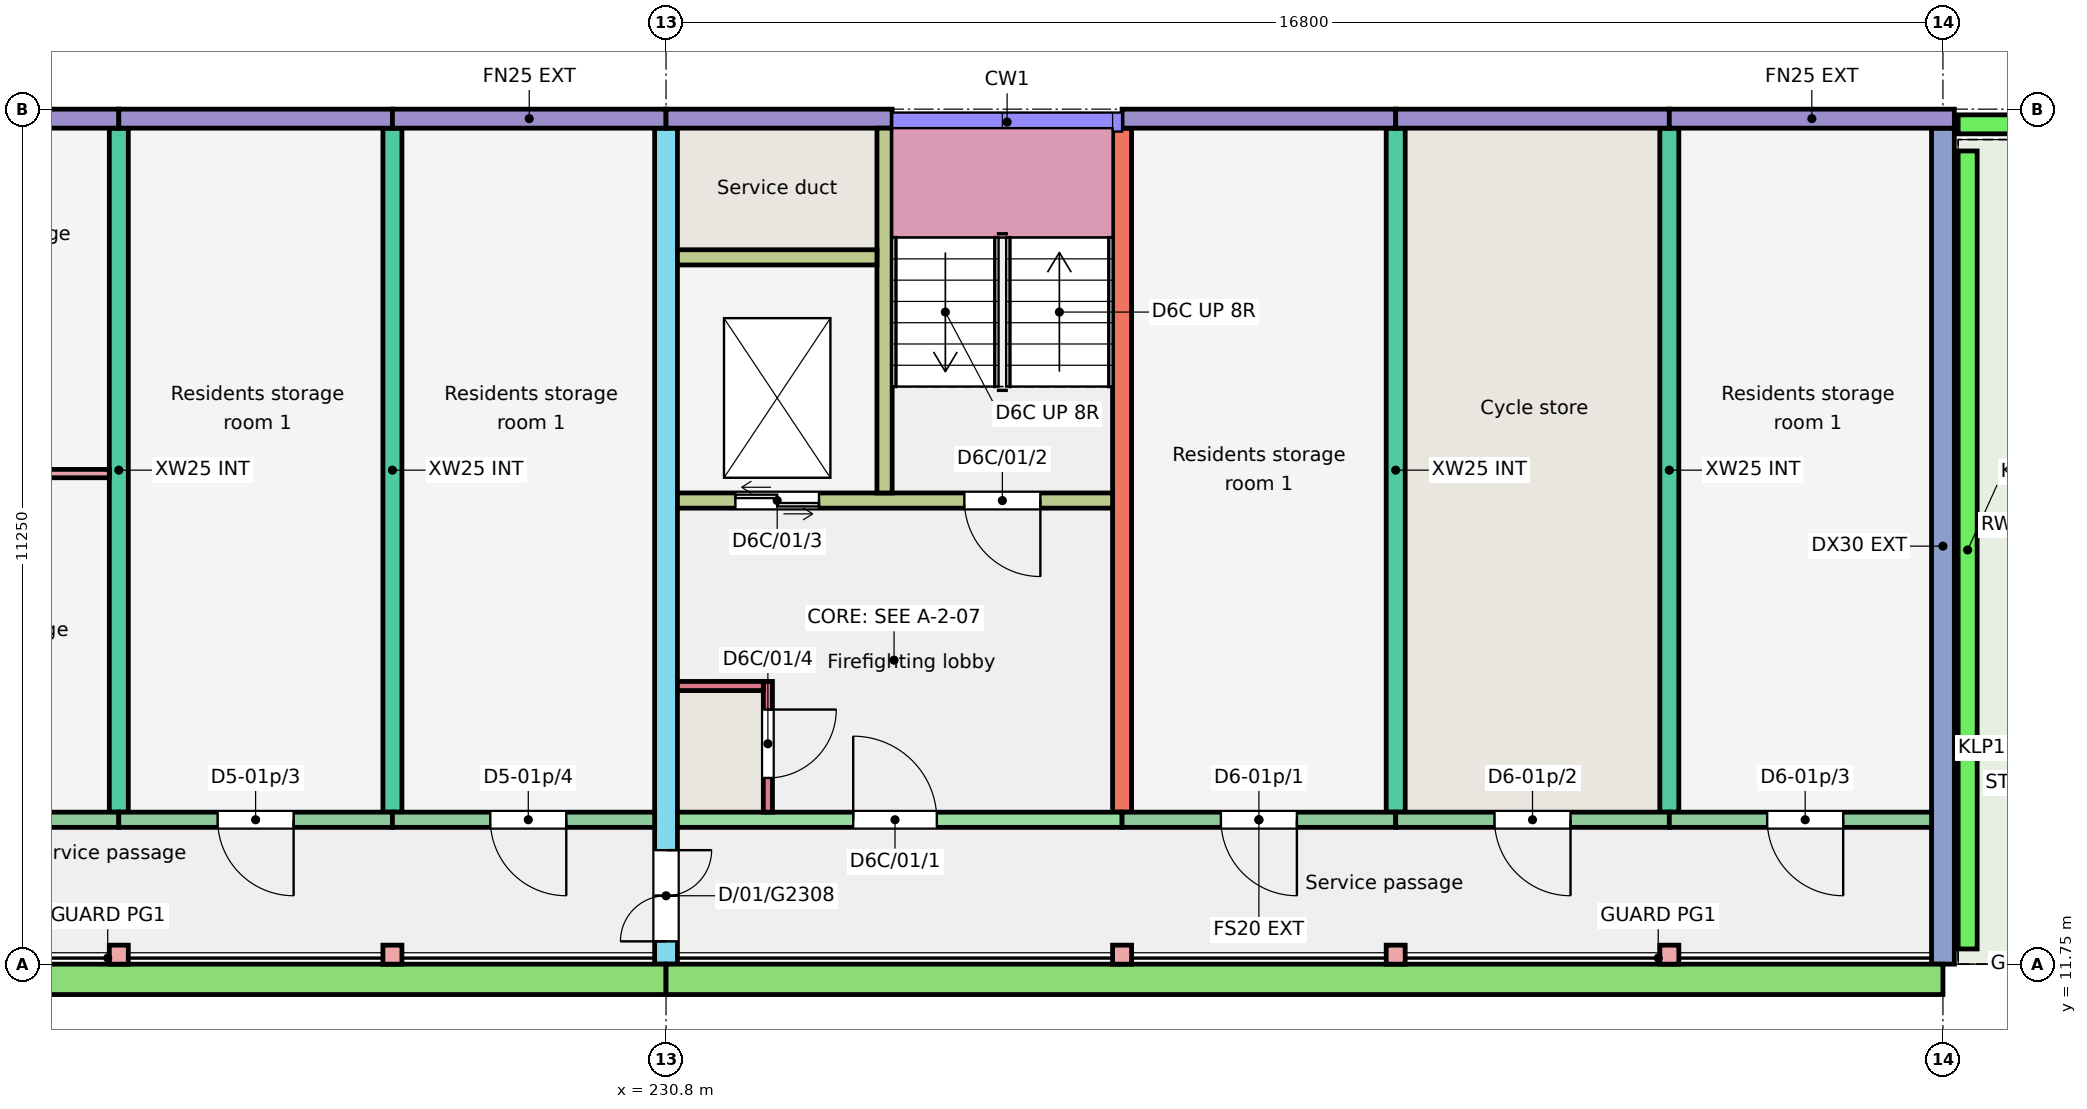
"""IFC4 building model, lengths in metres.
Left out: names, types, materials, properties, quantities, classifications, styles, units other than length and angle.
Written with IfcOpenShell. Run it as: python <this file> out.ifc"""

import sys

from ifc_helpers import new_model, si_unit, direction, frame, frame_2d, origin, origin_2d, place, context, subcontext, project, spatial, rectangle, extrude, element, fill, save


model = new_model("IFC4")
c1 = context("Model", 3, precision=1e-05, world=origin(), true_north=direction((0.0, 1.0)))
c2 = subcontext(c1, "Body", "Model", "MODEL_VIEW")
j1 = project(units=[si_unit("LENGTHUNIT", "METRE"), si_unit("PLANEANGLEUNIT", "RADIAN")], contexts=[c1])
p1 = place(None, origin())
s1 = spatial("IfcSite", under=j1, at=p1, CompositionType="ELEMENT")
p2 = place(p1, origin())
s2 = spatial("IfcBuilding", under=s1, at=p2, CompositionType="ELEMENT")
p3 = place(p2, frame((0.0, 0.0, 3.0)))
s3 = spatial("IfcBuildingStorey", under=s2, at=p3, CompositionType="ELEMENT", Elevation=3.0)
for number, where, z_axis, x_axis in (
    (1, (223.6, 13.75, 0.0), (0.0, 0.0, 1.0), (0.0, 1.0, 0.0)),
    (2, (227.2, 13.75, 0.0), (0.0, 0.0, 1.0), (0.0, 1.0, 0.0)),
):
    element("IfcWall", number, at=place(p3, frame(where, z_axis=z_axis, x_axis=x_axis)), inside=s3, PredefinedType="SHEAR", context=c2, shape_type="SweptSolid", body=[
        extrude(rectangle(XDim=9.0, YDim=0.25, at=frame_2d((4.5, 0.0))), origin(), (0.0, 0.0, 1.0), 3.0),
    ])
p4 = place(p3, frame((230.8, 11.75, 0.0), z_axis=(0.0, 0.0, 1.0), x_axis=(0.0, 1.0, 0.0)))
e3 = element("IfcWall", 3, at=p4, inside=s3, PredefinedType="SHEAR", context=c2, shape_type="SweptSolid", body=[
    extrude(rectangle(XDim=11.0, YDim=0.3, at=frame_2d((5.5, 0.0))), origin(), (0.0, 0.0, 1.0), 3.0),
])
p5 = place(p4, frame((0.3, 0.0, 0.0)))
e4 = element("IfcOpeningElement", 4, at=p5, cuts=e3, PredefinedType="OPENING", context=c2, shape_type="SweptSolid", body=[
    extrude(rectangle(XDim=1.2, YDim=2.1, at=frame_2d((0.6, 1.05))), frame((0.0, 0.16, 0.0), z_axis=(0.0, -1.0, 0.0), x_axis=(1.0, 0.0, 0.0)), (0.0, 0.0, 1.0), 0.32),
])
for number, where, z_axis, x_axis in (
    (5, (236.8, 13.75, 0.0), (0.0, 0.0, 1.0), (0.0, 1.0, 0.0)),
    (6, (240.4, 13.75, 0.0), (0.0, 0.0, 1.0), (0.0, 1.0, 0.0)),
    (7, (244.0, 13.75, 0.0), (0.0, 0.0, 1.0), (0.0, 1.0, 0.0)),
):
    element("IfcWall", number, at=place(p3, frame(where, z_axis=z_axis, x_axis=x_axis)), inside=s3, PredefinedType="SHEAR", context=c2, shape_type="SweptSolid", body=[
        extrude(rectangle(XDim=9.0, YDim=0.25, at=frame_2d((4.5, 0.0))), origin(), (0.0, 0.0, 1.0), 3.0),
    ])
p6 = place(p3, frame((247.6, 11.75, 0.0), z_axis=(0.0, 0.0, 1.0), x_axis=(0.0, 1.0, 0.0)))
e8 = element("IfcWall", 8, at=p6, inside=s3, PredefinedType="SHEAR", context=c2, shape_type="SweptSolid", body=[
    extrude(rectangle(XDim=11.0, YDim=0.3, at=frame_2d((5.5, 0.0))), origin(), (0.0, 0.0, 1.0), 3.0),
])
p7 = place(p3, frame((220.0, 22.875, 0.0), z_axis=(0.0, 0.0, 1.0), x_axis=(1.0, 0.0, 0.0)))
e9 = element("IfcWall", 9, at=p7, inside=s3, PredefinedType="SOLIDWALL", context=c2, shape_type="SweptSolid", body=[
    extrude(rectangle(XDim=3.6, YDim=0.25, at=frame_2d((1.8, 0.0))), origin(), (0.0, 0.0, 1.0), 3.0),
])
p8 = place(p3, frame((220.0, 13.65, 0.0), z_axis=(0.0, 0.0, 1.0), x_axis=(1.0, 0.0, 0.0)))
e10 = element("IfcWall", 10, at=p8, inside=s3, PredefinedType="SOLIDWALL", context=c2, shape_type="SweptSolid", body=[
    extrude(rectangle(XDim=3.6, YDim=0.2, at=frame_2d((1.8, 0.0))), origin(), (0.0, 0.0, 1.0), 3.0),
])
p9 = place(p8, frame((1.3, 0.0, 0.0)))
e11 = element("IfcOpeningElement", 11, at=p9, cuts=e10, PredefinedType="OPENING", context=c2, shape_type="SweptSolid", body=[
    extrude(rectangle(XDim=1.0, YDim=2.1, at=frame_2d((0.5, 1.05))), frame((0.0, 0.11, 0.0), z_axis=(0.0, -1.0, 0.0), x_axis=(1.0, 0.0, 0.0)), (0.0, 0.0, 1.0), 0.22),
])
p10 = place(p3, frame((223.6, 22.875, 0.0), z_axis=(0.0, 0.0, 1.0), x_axis=(1.0, 0.0, 0.0)))
e12 = element("IfcWall", 12, at=p10, inside=s3, PredefinedType="SOLIDWALL", context=c2, shape_type="SweptSolid", body=[
    extrude(rectangle(XDim=3.6, YDim=0.25, at=frame_2d((1.8, 0.0))), origin(), (0.0, 0.0, 1.0), 3.0),
])
p11 = place(p3, frame((223.6, 13.65, 0.0), z_axis=(0.0, 0.0, 1.0), x_axis=(1.0, 0.0, 0.0)))
e13 = element("IfcWall", 13, at=p11, inside=s3, PredefinedType="SOLIDWALL", context=c2, shape_type="SweptSolid", body=[
    extrude(rectangle(XDim=3.6, YDim=0.2, at=frame_2d((1.8, 0.0))), origin(), (0.0, 0.0, 1.0), 3.0),
])
p12 = place(p11, frame((1.3, 0.0, 0.0)))
e14 = element("IfcOpeningElement", 14, at=p12, cuts=e13, PredefinedType="OPENING", context=c2, shape_type="SweptSolid", body=[
    extrude(rectangle(XDim=1.0, YDim=2.1, at=frame_2d((0.5, 1.05))), frame((0.0, 0.11, 0.0), z_axis=(0.0, -1.0, 0.0), x_axis=(1.0, 0.0, 0.0)), (0.0, 0.0, 1.0), 0.22),
])
p13 = place(p3, frame((227.2, 22.875, 0.0), z_axis=(0.0, 0.0, 1.0), x_axis=(1.0, 0.0, 0.0)))
e15 = element("IfcWall", 15, at=p13, inside=s3, PredefinedType="SOLIDWALL", context=c2, shape_type="SweptSolid", body=[
    extrude(rectangle(XDim=3.6, YDim=0.25, at=frame_2d((1.8, 0.0))), origin(), (0.0, 0.0, 1.0), 3.0),
])
p14 = place(p3, frame((227.2, 13.65, 0.0), z_axis=(0.0, 0.0, 1.0), x_axis=(1.0, 0.0, 0.0)))
e16 = element("IfcWall", 16, at=p14, inside=s3, PredefinedType="SOLIDWALL", context=c2, shape_type="SweptSolid", body=[
    extrude(rectangle(XDim=3.45, YDim=0.2, at=frame_2d((1.725, 0.0))), origin(), (0.0, 0.0, 1.0), 3.0),
])
p15 = place(p14, frame((1.288, 0.0, 0.0)))
e17 = element("IfcOpeningElement", 17, at=p15, cuts=e16, PredefinedType="OPENING", context=c2, shape_type="SweptSolid", body=[
    extrude(rectangle(XDim=1.0, YDim=2.1, at=frame_2d((0.5, 1.05))), frame((0.0, 0.11, 0.0), z_axis=(0.0, -1.0, 0.0), x_axis=(1.0, 0.0, 0.0)), (0.0, 0.0, 1.0), 0.22),
])
p16 = place(p3, frame((230.8, 22.875, 0.0), z_axis=(0.0, 0.0, 1.0), x_axis=(1.0, 0.0, 0.0)))
e18 = element("IfcWall", 18, at=p16, inside=s3, PredefinedType="SOLIDWALL", context=c2, shape_type="SweptSolid", body=[
    extrude(rectangle(XDim=2.975, YDim=0.25, at=frame_2d((1.487, 0.0))), origin(), (0.0, 0.0, 1.0), 3.0),
])
p17 = place(p3, frame((230.95, 13.65, 0.0), z_axis=(0.0, 0.0, 1.0), x_axis=(1.0, 0.0, 0.0)))
e19 = element("IfcWall", 19, at=p17, inside=s3, PredefinedType="SHEAR", context=c2, shape_type="SweptSolid", body=[
    extrude(rectangle(XDim=5.85, YDim=0.2, at=frame_2d((2.925, 0.0))), origin(), (0.0, 0.0, 1.0), 3.0),
])
p18 = place(p17, frame((2.312, 0.0, 0.0)))
e20 = element("IfcOpeningElement", 20, at=p18, cuts=e19, PredefinedType="OPENING", context=c2, shape_type="SweptSolid", body=[
    extrude(rectangle(XDim=1.1, YDim=2.1, at=frame_2d((0.55, 1.05))), frame((0.0, 0.11, 0.0), z_axis=(0.0, -1.0, 0.0), x_axis=(1.0, 0.0, 0.0)), (0.0, 0.0, 1.0), 0.22),
])
p19 = place(p3, frame((230.95, 17.85, 0.0), z_axis=(0.0, 0.0, 1.0), x_axis=(1.0, 0.0, 0.0)))
e21 = element("IfcWall", 21, at=p19, inside=s3, PredefinedType="SHEAR", context=c2, shape_type="SweptSolid", body=[
    extrude(rectangle(XDim=5.725, YDim=0.2, at=frame_2d((2.863, 0.0))), origin(), (0.0, 0.0, 1.0), 3.0),
])
p20 = place(p19, frame((3.775, 0.0, 0.0)))
e22 = element("IfcOpeningElement", 22, at=p20, cuts=e21, PredefinedType="OPENING", context=c2, shape_type="SweptSolid", body=[
    extrude(rectangle(XDim=1.0, YDim=2.1, at=frame_2d((0.5, 1.05))), frame((0.0, 0.11, 0.0), z_axis=(0.0, -1.0, 0.0), x_axis=(1.0, 0.0, 0.0)), (0.0, 0.0, 1.0), 0.22),
])
p21 = place(p19, frame((0.762, 0.0, 0.0)))
e23 = element("IfcOpeningElement", 23, at=p21, cuts=e21, PredefinedType="OPENING", context=c2, shape_type="SweptSolid", body=[
    extrude(rectangle(XDim=1.1, YDim=2.1, at=frame_2d((0.55, 1.05))), frame((0.0, 0.11, 0.0), z_axis=(0.0, -1.0, 0.0), x_axis=(1.0, 0.0, 0.0)), (0.0, 0.0, 1.0), 0.22),
])
p22 = place(p3, frame((233.675, 17.95, 0.0), z_axis=(0.0, 0.0, 1.0), x_axis=(0.0, 1.0, 0.0)))
e24 = element("IfcWall", 24, at=p22, inside=s3, PredefinedType="SHEAR", context=c2, shape_type="SweptSolid", body=[
    extrude(rectangle(XDim=4.8, YDim=0.2, at=frame_2d((2.4, 0.0))), origin(), (0.0, 0.0, 1.0), 3.0),
])
p23 = place(p3, frame((230.95, 21.05, 0.0), z_axis=(0.0, 0.0, 1.0), x_axis=(1.0, 0.0, 0.0)))
e25 = element("IfcWall", 25, at=p23, inside=s3, PredefinedType="SHEAR", context=c2, shape_type="SweptSolid", body=[
    extrude(rectangle(XDim=2.625, YDim=0.2, at=frame_2d((1.312, 0.0))), origin(), (0.0, 0.0, 1.0), 3.0),
])
p24 = place(p3, frame((232.14, 13.75, 0.0), z_axis=(0.0, 0.0, 1.0), x_axis=(0.0, 1.0, 0.0)))
e26 = element("IfcWall", 26, at=p24, inside=s3, PredefinedType="SHEAR", context=c2, shape_type="SweptSolid", body=[
    extrude(rectangle(XDim=1.72, YDim=0.12, at=frame_2d((0.86, 0.0))), origin(), (0.0, 0.0, 1.0), 3.0),
])
p25 = place(p24, frame((0.45, 0.0, 0.0)))
e27 = element("IfcOpeningElement", 27, at=p25, cuts=e26, PredefinedType="OPENING", context=c2, shape_type="SweptSolid", body=[
    extrude(rectangle(XDim=0.9, YDim=2.1, at=frame_2d((0.45, 1.05))), frame((0.0, 0.07, 0.0), z_axis=(0.0, -1.0, 0.0), x_axis=(1.0, 0.0, 0.0)), (0.0, 0.0, 1.0), 0.14),
])
p26 = place(p3, frame((230.95, 15.41, 0.0), z_axis=(0.0, 0.0, 1.0), x_axis=(1.0, 0.0, 0.0)))
e28 = element("IfcWall", 28, at=p26, inside=s3, PredefinedType="SHEAR", context=c2, shape_type="SweptSolid", body=[
    extrude(rectangle(XDim=1.13, YDim=0.12, at=frame_2d((0.565, 0.0))), origin(), (0.0, 0.0, 1.0), 3.0),
])
p27 = place(p3, frame((236.8, 22.875, 0.0), z_axis=(0.0, 0.0, 1.0), x_axis=(1.0, 0.0, 0.0)))
e29 = element("IfcWall", 29, at=p27, inside=s3, PredefinedType="SOLIDWALL", context=c2, shape_type="SweptSolid", body=[
    extrude(rectangle(XDim=3.6, YDim=0.25, at=frame_2d((1.8, 0.0))), origin(), (0.0, 0.0, 1.0), 3.0),
])
p28 = place(p3, frame((236.8, 13.65, 0.0), z_axis=(0.0, 0.0, 1.0), x_axis=(1.0, 0.0, 0.0)))
e30 = element("IfcWall", 30, at=p28, inside=s3, PredefinedType="SOLIDWALL", context=c2, shape_type="SweptSolid", body=[
    extrude(rectangle(XDim=3.6, YDim=0.2, at=frame_2d((1.8, 0.0))), origin(), (0.0, 0.0, 1.0), 3.0),
])
p29 = place(p28, frame((1.3, 0.0, 0.0)))
e31 = element("IfcOpeningElement", 31, at=p29, cuts=e30, PredefinedType="OPENING", context=c2, shape_type="SweptSolid", body=[
    extrude(rectangle(XDim=1.0, YDim=2.1, at=frame_2d((0.5, 1.05))), frame((0.0, 0.11, 0.0), z_axis=(0.0, -1.0, 0.0), x_axis=(1.0, 0.0, 0.0)), (0.0, 0.0, 1.0), 0.22),
])
p30 = place(p3, frame((240.4, 22.875, 0.0), z_axis=(0.0, 0.0, 1.0), x_axis=(1.0, 0.0, 0.0)))
e32 = element("IfcWall", 32, at=p30, inside=s3, PredefinedType="SOLIDWALL", context=c2, shape_type="SweptSolid", body=[
    extrude(rectangle(XDim=3.6, YDim=0.25, at=frame_2d((1.8, 0.0))), origin(), (0.0, 0.0, 1.0), 3.0),
])
p31 = place(p3, frame((240.4, 13.65, 0.0), z_axis=(0.0, 0.0, 1.0), x_axis=(1.0, 0.0, 0.0)))
e33 = element("IfcWall", 33, at=p31, inside=s3, PredefinedType="SOLIDWALL", context=c2, shape_type="SweptSolid", body=[
    extrude(rectangle(XDim=3.6, YDim=0.2, at=frame_2d((1.8, 0.0))), origin(), (0.0, 0.0, 1.0), 3.0),
])
p32 = place(p31, frame((1.3, 0.0, 0.0)))
e34 = element("IfcOpeningElement", 34, at=p32, cuts=e33, PredefinedType="OPENING", context=c2, shape_type="SweptSolid", body=[
    extrude(rectangle(XDim=1.0, YDim=2.1, at=frame_2d((0.5, 1.05))), frame((0.0, 0.11, 0.0), z_axis=(0.0, -1.0, 0.0), x_axis=(1.0, 0.0, 0.0)), (0.0, 0.0, 1.0), 0.22),
])
p33 = place(p3, frame((244.0, 22.875, 0.0), z_axis=(0.0, 0.0, 1.0), x_axis=(1.0, 0.0, 0.0)))
e35 = element("IfcWall", 35, at=p33, inside=s3, PredefinedType="SOLIDWALL", context=c2, shape_type="SweptSolid", body=[
    extrude(rectangle(XDim=3.75, YDim=0.25, at=frame_2d((1.875, 0.0))), origin(), (0.0, 0.0, 1.0), 3.0),
])
p34 = place(p3, frame((244.0, 13.65, 0.0), z_axis=(0.0, 0.0, 1.0), x_axis=(1.0, 0.0, 0.0)))
e36 = element("IfcWall", 36, at=p34, inside=s3, PredefinedType="SOLIDWALL", context=c2, shape_type="SweptSolid", body=[
    extrude(rectangle(XDim=3.45, YDim=0.2, at=frame_2d((1.725, 0.0))), origin(), (0.0, 0.0, 1.0), 3.0),
])
p35 = place(p34, frame((1.288, 0.0, 0.0)))
e37 = element("IfcOpeningElement", 37, at=p35, cuts=e36, PredefinedType="OPENING", context=c2, shape_type="SweptSolid", body=[
    extrude(rectangle(XDim=1.0, YDim=2.1, at=frame_2d((0.5, 1.05))), frame((0.0, 0.11, 0.0), z_axis=(0.0, -1.0, 0.0), x_axis=(1.0, 0.0, 0.0)), (0.0, 0.0, 1.0), 0.22),
])
for number, where, z_axis, x_axis in (
    (38, (223.6, 11.875, 0.0), (0.0, 0.0, 1.0), (1.0, 0.0, 0.0)),
    (39, (227.2, 11.875, 0.0), (0.0, 0.0, 1.0), (1.0, 0.0, 0.0)),
    (40, (236.8, 11.875, 0.0), (0.0, 0.0, 1.0), (1.0, 0.0, 0.0)),
    (41, (240.4, 11.875, 0.0), (0.0, 0.0, 1.0), (1.0, 0.0, 0.0)),
    (42, (244.0, 11.875, 0.0), (0.0, 0.0, 1.0), (1.0, 0.0, 0.0)),
):
    element("IfcColumn", number, at=place(p3, frame(where, z_axis=z_axis, x_axis=x_axis)), inside=s3, PredefinedType="COLUMN", context=c2, shape_type="SweptSolid", body=[
        extrude(rectangle(XDim=0.25, YDim=0.25, at=origin_2d()), origin(), (0.0, 0.0, 1.0), 3.0),
    ])
for number, where, z_axis, x_axis in (
    (43, (214.0, 11.55, 0.0), (0.0, 0.0, 1.0), (1.0, 0.0, 0.0)),
    (44, (230.8, 11.55, 0.0), (0.0, 0.0, 1.0), (1.0, 0.0, 0.0)),
):
    element("IfcWall", number, at=place(p3, frame(where, z_axis=z_axis, x_axis=x_axis)), inside=s3, PredefinedType="SOLIDWALL", context=c2, shape_type="SweptSolid", body=[
        extrude(rectangle(XDim=16.8, YDim=0.4, at=frame_2d((8.4, 0.0))), origin(), (0.0, 0.0, 1.0), 2.85),
    ])
p36 = place(p3, frame((247.8, 22.8, 0.0), z_axis=(0.0, 0.0, 1.0), x_axis=(1.0, 0.0, 0.0)))
e45 = element("IfcWall", 45, at=p36, inside=s3, PredefinedType="PARAPET", context=c2, shape_type="SweptSolid", body=[
    extrude(rectangle(XDim=6.15, YDim=0.25, at=frame_2d((3.075, 0.0))), origin(), (0.0, 0.0, 1.0), 1.1),
])
p37 = place(p2, origin())
s4 = spatial("IfcBuildingStorey", under=s2, at=p37, CompositionType="ELEMENT", Elevation=0.0)
p38 = place(p37, frame((247.6, 11.55, -0.25), z_axis=(0.0, 0.0, 1.0), x_axis=(1.0, 0.0, 0.0)))
e46 = element("IfcWall", 46, at=p38, inside=s4, PredefinedType="SOLIDWALL", context=c2, shape_type="SweptSolid", body=[
    extrude(rectangle(XDim=2.7, YDim=0.4, at=frame_2d((1.35, 0.0))), origin(), (0.0, 0.0, 1.0), 6.25),
])
p39 = place(p3, frame((247.925, 11.95, 0.0), z_axis=(0.0, 0.0, 1.0), x_axis=(0.0, 1.0, 0.0)))
e47 = element("IfcWall", 47, at=p39, inside=s3, PredefinedType="PARAPET", context=c2, shape_type="SweptSolid", body=[
    extrude(rectangle(XDim=10.5, YDim=0.25, at=frame_2d((5.25, 0.0))), origin(), (0.0, 0.0, 1.0), 1.1),
])
p40 = place(p3, frame((220.125, 18.205, 0.0), z_axis=(0.0, 0.0, 1.0), x_axis=(1.0, 0.0, 0.0)))
e48 = element("IfcWall", 48, at=p40, inside=s3, PredefinedType="PARTITIONING", context=c2, shape_type="SweptSolid", body=[
    extrude(rectangle(XDim=3.35, YDim=0.11, at=frame_2d((1.675, 0.0))), origin(), (0.0, 0.0, 1.0), 2.8),
])
p41 = place(p40, frame((1.225, 0.0, 0.0)))
e49 = element("IfcOpeningElement", 49, at=p41, cuts=e48, PredefinedType="OPENING", context=c2, shape_type="SweptSolid", body=[
    extrude(rectangle(XDim=0.9, YDim=2.1, at=frame_2d((0.45, 1.05))), frame((0.0, 0.065, 0.0), z_axis=(0.0, -1.0, 0.0), x_axis=(1.0, 0.0, 0.0)), (0.0, 0.0, 1.0), 0.13),
])
p42 = place(p12, origin())
e50 = element("IfcDoor", 50, at=p42, inside=s3, OperationType="SINGLE_SWING_RIGHT", PredefinedType="DOOR", context=c2, shape_type="SweptSolid", body=[
    extrude(rectangle(XDim=1.0, YDim=2.1, at=frame_2d((0.5, 1.05))), frame((0.0, 0.025, 0.0), z_axis=(0.0, -1.0, 0.0), x_axis=(1.0, 0.0, 0.0)), (0.0, 0.0, 1.0), 0.05),
])
fill(e14, e50)
p43 = place(p15, origin())
e51 = element("IfcDoor", 51, at=p43, inside=s3, OperationType="SINGLE_SWING_RIGHT", PredefinedType="DOOR", context=c2, shape_type="SweptSolid", body=[
    extrude(rectangle(XDim=1.0, YDim=2.1, at=frame_2d((0.5, 1.05))), frame((0.0, 0.025, 0.0), z_axis=(0.0, -1.0, 0.0), x_axis=(1.0, 0.0, 0.0)), (0.0, 0.0, 1.0), 0.05),
])
fill(e17, e51)
p44 = place(p29, origin())
e52 = element("IfcDoor", 52, at=p44, inside=s3, OperationType="SINGLE_SWING_RIGHT", PredefinedType="DOOR", context=c2, shape_type="SweptSolid", body=[
    extrude(rectangle(XDim=1.0, YDim=2.1, at=frame_2d((0.5, 1.05))), frame((0.0, 0.025, 0.0), z_axis=(0.0, -1.0, 0.0), x_axis=(1.0, 0.0, 0.0)), (0.0, 0.0, 1.0), 0.05),
])
fill(e31, e52)
p45 = place(p32, origin())
e53 = element("IfcDoor", 53, at=p45, inside=s3, OperationType="SINGLE_SWING_RIGHT", PredefinedType="DOOR", context=c2, shape_type="SweptSolid", body=[
    extrude(rectangle(XDim=1.0, YDim=2.1, at=frame_2d((0.5, 1.05))), frame((0.0, 0.025, 0.0), z_axis=(0.0, -1.0, 0.0), x_axis=(1.0, 0.0, 0.0)), (0.0, 0.0, 1.0), 0.05),
])
fill(e34, e53)
p46 = place(p35, origin())
e54 = element("IfcDoor", 54, at=p46, inside=s3, OperationType="SINGLE_SWING_RIGHT", PredefinedType="DOOR", context=c2, shape_type="SweptSolid", body=[
    extrude(rectangle(XDim=1.0, YDim=2.1, at=frame_2d((0.5, 1.05))), frame((0.0, 0.025, 0.0), z_axis=(0.0, -1.0, 0.0), x_axis=(1.0, 0.0, 0.0)), (0.0, 0.0, 1.0), 0.05),
])
fill(e37, e54)
p47 = place(p18, origin())
e55 = element("IfcDoor", 55, at=p47, inside=s3, OperationType="SINGLE_SWING_LEFT", PredefinedType="DOOR", context=c2, shape_type="SweptSolid", body=[
    extrude(rectangle(XDim=1.1, YDim=2.1, at=frame_2d((0.55, 1.05))), frame((0.0, 0.025, 0.0), z_axis=(0.0, -1.0, 0.0), x_axis=(1.0, 0.0, 0.0)), (0.0, 0.0, 1.0), 0.05),
])
fill(e20, e55)
p48 = place(p20, origin())
e56 = element("IfcDoor", 56, at=p48, inside=s3, OperationType="SINGLE_SWING_RIGHT", PredefinedType="DOOR", context=c2, shape_type="SweptSolid", body=[
    extrude(rectangle(XDim=1.0, YDim=2.1, at=frame_2d((0.5, 1.05))), frame((0.0, 0.025, 0.0), z_axis=(0.0, -1.0, 0.0), x_axis=(1.0, 0.0, 0.0)), (0.0, 0.0, 1.0), 0.05),
])
fill(e22, e56)
p49 = place(p21, origin())
e57 = element("IfcDoor", 57, at=p49, inside=s3, OperationType="DOUBLE_DOOR_SLIDING", PredefinedType="DOOR", context=c2, shape_type="SweptSolid", body=[
    extrude(rectangle(XDim=1.1, YDim=2.1, at=frame_2d((0.55, 1.05))), frame((0.0, 0.025, 0.0), z_axis=(0.0, -1.0, 0.0), x_axis=(1.0, 0.0, 0.0)), (0.0, 0.0, 1.0), 0.05),
])
fill(e23, e57)
p50 = place(p25, origin())
e58 = element("IfcDoor", 58, at=p50, inside=s3, OperationType="SINGLE_SWING_RIGHT", PredefinedType="DOOR", context=c2, shape_type="SweptSolid", body=[
    extrude(rectangle(XDim=0.9, YDim=2.1, at=frame_2d((0.45, 1.05))), frame((0.0, 0.025, 0.0), z_axis=(0.0, -1.0, 0.0), x_axis=(1.0, 0.0, 0.0)), (0.0, 0.0, 1.0), 0.05),
])
fill(e27, e58)
p51 = place(p5, origin())
e59 = element("IfcDoor", 59, at=p51, inside=s3, OperationType="DOUBLE_DOOR_SINGLE_SWING", PredefinedType="DOOR", context=c2, shape_type="SweptSolid", body=[
    extrude(rectangle(XDim=1.2, YDim=2.1, at=frame_2d((0.6, 1.05))), frame((0.0, 0.025, 0.0), z_axis=(0.0, -1.0, 0.0), x_axis=(1.0, 0.0, 0.0)), (0.0, 0.0, 1.0), 0.05),
])
fill(e4, e59)
save(model, sys.argv[1])
